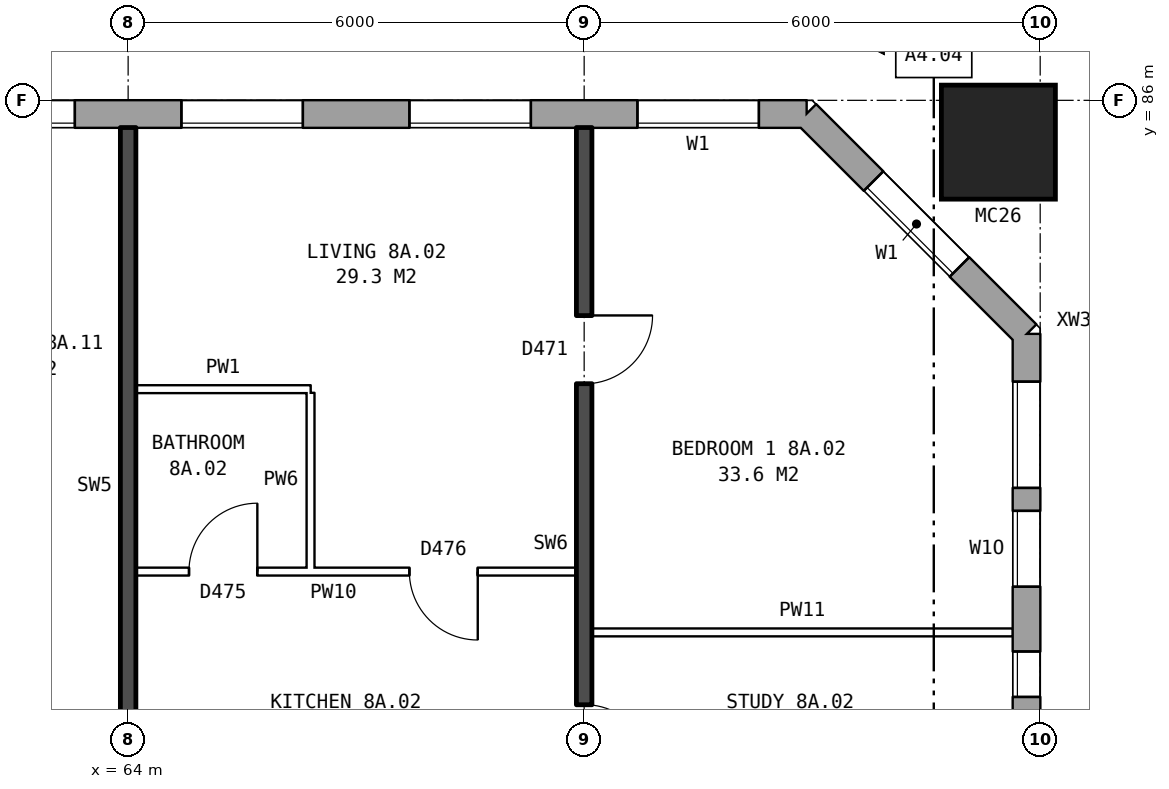
"""IFC4 building model, lengths in metres.
Left out: names, types, materials, properties, quantities, classifications, styles, units other than length and angle.
Written with IfcOpenShell. Run it as: python <this file> out.ifc"""

import sys

from ifc_helpers import new_model, si_unit, direction, frame, frame_2d, origin, origin_2d, place, context, subcontext, project, spatial, rectangle, hollow_rectangle, extrude, element, fill, save


model = new_model("IFC4")
c1 = context("Model", 3, precision=1e-05, world=origin(), true_north=direction((0.0, 1.0)))
c2 = subcontext(c1, "Body", "Model", "MODEL_VIEW")
j1 = project(units=[si_unit("LENGTHUNIT", "METRE"), si_unit("PLANEANGLEUNIT", "RADIAN")], contexts=[c1])
p1 = place(None, origin())
s1 = spatial("IfcSite", under=j1, at=p1, CompositionType="ELEMENT")
p2 = place(p1, origin())
s2 = spatial("IfcBuilding", under=s1, at=p2, CompositionType="ELEMENT")
p3 = place(p2, frame((0.0, 0.0, 31.9)))
s3 = spatial("IfcBuildingStorey", under=s2, at=p3, CompositionType="ELEMENT", Elevation=31.9)
p4 = place(p3, frame((75.45, 85.45, 0.0), z_axis=(0.0, 0.0, 1.0), x_axis=(1.0, 0.0, 0.0)))
e1 = element("IfcColumn", 1, at=p4, inside=s3, PredefinedType="COLUMN", context=c2, shape_type="SweptSolid", body=[
    extrude(hollow_rectangle(XDim=1.5, YDim=1.5, WallThickness=0.08, at=origin_2d()), origin(), (0.0, 0.0, 1.0), 3.1),
])
p5 = place(p3, frame((75.82, 57.075, 0.0), z_axis=(0.0, 0.0, 1.0), x_axis=(0.0, 1.0, 0.0)))
e2 = element("IfcWall", 2, at=p5, inside=s3, PredefinedType="STANDARD", context=c2, shape_type="SweptSolid", body=[
    extrude(rectangle(XDim=25.851, YDim=0.36, at=frame_2d((12.925, 0.0))), origin(), (0.0, 0.0, 1.0), 2.85),
])
p6 = place(p5, frame((0.3, 0.0, 0.8)))
e3 = element("IfcOpeningElement", 3, at=p6, cuts=e2, PredefinedType="OPENING", context=c2, shape_type="SweptSolid", body=[
    extrude(rectangle(XDim=1.4, YDim=1.8, at=frame_2d((0.7, 0.9))), frame((0.0, 0.19, 0.0), z_axis=(0.0, -1.0, 0.0), x_axis=(1.0, 0.0, 0.0)), (0.0, 0.0, 1.0), 0.38),
])
p7 = place(p5, frame((4.075, 0.0, 0.25)))
e4 = element("IfcOpeningElement", 4, at=p7, cuts=e2, PredefinedType="OPENING", context=c2, shape_type="SweptSolid", body=[
    extrude(rectangle(XDim=0.6, YDim=0.9, at=frame_2d((0.3, 0.45))), frame((0.0, 0.19, 0.0), z_axis=(0.0, -1.0, 0.0), x_axis=(1.0, 0.0, 0.0)), (0.0, 0.0, 1.0), 0.38),
])
p8 = place(p5, frame((19.225, 0.0, 1.65)))
e5 = element("IfcOpeningElement", 5, at=p8, cuts=e2, PredefinedType="OPENING", context=c2, shape_type="SweptSolid", body=[
    extrude(rectangle(XDim=1.4, YDim=0.9, at=frame_2d((0.7, 0.45))), frame((0.0, 0.19, 0.0), z_axis=(0.0, -1.0, 0.0), x_axis=(1.0, 0.0, 0.0)), (0.0, 0.0, 1.0), 0.38),
])
p9 = place(p5, frame((22.525, 0.0, 0.8)))
e6 = element("IfcOpeningElement", 6, at=p9, cuts=e2, PredefinedType="OPENING", context=c2, shape_type="SweptSolid", body=[
    extrude(rectangle(XDim=1.0, YDim=1.2, at=frame_2d((0.5, 0.6))), frame((0.0, 0.19, 0.0), z_axis=(0.0, -1.0, 0.0), x_axis=(1.0, 0.0, 0.0)), (0.0, 0.0, 1.0), 0.38),
])
p10 = place(p5, frame((2.0, 0.0, 0.8)))
e7 = element("IfcOpeningElement", 7, at=p10, cuts=e2, PredefinedType="OPENING", context=c2, shape_type="SweptSolid", body=[
    extrude(rectangle(XDim=0.8, YDim=1.5, at=frame_2d((0.4, 0.75))), frame((0.0, 0.19, 0.0), z_axis=(0.0, -1.0, 0.0), x_axis=(1.0, 0.0, 0.0)), (0.0, 0.0, 1.0), 0.38),
])
p11 = place(p5, frame((5.125, 0.0, 1.65)))
e8 = element("IfcOpeningElement", 8, at=p11, cuts=e2, PredefinedType="OPENING", context=c2, shape_type="SweptSolid", body=[
    extrude(rectangle(XDim=1.4, YDim=0.9, at=frame_2d((0.7, 0.45))), frame((0.0, 0.19, 0.0), z_axis=(0.0, -1.0, 0.0), x_axis=(1.0, 0.0, 0.0)), (0.0, 0.0, 1.0), 0.38),
])
p12 = place(p5, frame((21.075, 0.0, 0.25)))
e9 = element("IfcOpeningElement", 9, at=p12, cuts=e2, PredefinedType="OPENING", context=c2, shape_type="SweptSolid", body=[
    extrude(rectangle(XDim=0.6, YDim=0.9, at=frame_2d((0.3, 0.45))), frame((0.0, 0.19, 0.0), z_axis=(0.0, -1.0, 0.0), x_axis=(1.0, 0.0, 0.0)), (0.0, 0.0, 1.0), 0.38),
])
p13 = place(p5, frame((23.825, 0.0, 0.8)))
e10 = element("IfcOpeningElement", 10, at=p13, cuts=e2, PredefinedType="OPENING", context=c2, shape_type="SweptSolid", body=[
    extrude(rectangle(XDim=1.4, YDim=1.8, at=frame_2d((0.7, 0.9))), frame((0.0, 0.19, 0.0), z_axis=(0.0, -1.0, 0.0), x_axis=(1.0, 0.0, 0.0)), (0.0, 0.0, 1.0), 0.38),
])
p14 = place(p3, frame((75.82, 82.925, 0.0), z_axis=(0.0, 0.0, 1.0), x_axis=(-0.707106781187, 0.707106781187, 0.0)))
e11 = element("IfcWall", 11, at=p14, inside=s3, PredefinedType="STANDARD", context=c2, shape_type="SweptSolid", body=[
    extrude(rectangle(XDim=4.094, YDim=0.36, at=frame_2d((2.047, 0.0))), origin(), (0.0, 0.0, 1.0), 2.85),
])
p15 = place(p14, frame((1.247, 0.0, 0.8)))
e12 = element("IfcOpeningElement", 12, at=p15, cuts=e11, PredefinedType="OPENING", context=c2, shape_type="SweptSolid", body=[
    extrude(rectangle(XDim=1.6, YDim=1.8, at=frame_2d((0.8, 0.9))), frame((0.0, 0.19, 0.0), z_axis=(0.0, -1.0, 0.0), x_axis=(1.0, 0.0, 0.0)), (0.0, 0.0, 1.0), 0.38),
])
p16 = place(p3, frame((72.925, 85.82, 0.0), z_axis=(0.0, 0.0, 1.0), x_axis=(-1.0, 0.0, 0.0)))
e13 = element("IfcWall", 13, at=p16, inside=s3, PredefinedType="STANDARD", context=c2, shape_type="SweptSolid", body=[
    extrude(rectangle(XDim=50.101, YDim=0.36, at=frame_2d((25.05, 0.0))), origin(), (0.0, 0.0, 1.0), 2.85),
])
p17 = place(p16, frame((0.625, 0.0, 0.8)))
e14 = element("IfcOpeningElement", 14, at=p17, cuts=e13, PredefinedType="OPENING", context=c2, shape_type="SweptSolid", body=[
    extrude(rectangle(XDim=1.6, YDim=1.8, at=frame_2d((0.8, 0.9))), frame((0.0, 0.19, 0.0), z_axis=(0.0, -1.0, 0.0), x_axis=(1.0, 0.0, 0.0)), (0.0, 0.0, 1.0), 0.38),
])
p18 = place(p16, frame((3.625, 0.0, 0.8)))
e15 = element("IfcOpeningElement", 15, at=p18, cuts=e13, PredefinedType="OPENING", context=c2, shape_type="SweptSolid", body=[
    extrude(rectangle(XDim=1.6, YDim=1.8, at=frame_2d((0.8, 0.9))), frame((0.0, 0.19, 0.0), z_axis=(0.0, -1.0, 0.0), x_axis=(1.0, 0.0, 0.0)), (0.0, 0.0, 1.0), 0.38),
])
p19 = place(p16, frame((6.625, 0.0, 0.8)))
e16 = element("IfcOpeningElement", 16, at=p19, cuts=e13, PredefinedType="OPENING", context=c2, shape_type="SweptSolid", body=[
    extrude(rectangle(XDim=1.6, YDim=1.8, at=frame_2d((0.8, 0.9))), frame((0.0, 0.19, 0.0), z_axis=(0.0, -1.0, 0.0), x_axis=(1.0, 0.0, 0.0)), (0.0, 0.0, 1.0), 0.38),
])
p20 = place(p16, frame((9.625, 0.0, 0.8)))
e17 = element("IfcOpeningElement", 17, at=p20, cuts=e13, PredefinedType="OPENING", context=c2, shape_type="SweptSolid", body=[
    extrude(rectangle(XDim=1.6, YDim=1.8, at=frame_2d((0.8, 0.9))), frame((0.0, 0.19, 0.0), z_axis=(0.0, -1.0, 0.0), x_axis=(1.0, 0.0, 0.0)), (0.0, 0.0, 1.0), 0.38),
])
p21 = place(p16, frame((12.625, 0.0, 0.8)))
e18 = element("IfcOpeningElement", 18, at=p21, cuts=e13, PredefinedType="OPENING", context=c2, shape_type="SweptSolid", body=[
    extrude(rectangle(XDim=1.6, YDim=1.8, at=frame_2d((0.8, 0.9))), frame((0.0, 0.19, 0.0), z_axis=(0.0, -1.0, 0.0), x_axis=(1.0, 0.0, 0.0)), (0.0, 0.0, 1.0), 0.38),
])
p22 = place(p16, frame((15.125, 0.0, 0.8)))
e19 = element("IfcOpeningElement", 19, at=p22, cuts=e13, PredefinedType="OPENING", context=c2, shape_type="SweptSolid", body=[
    extrude(rectangle(XDim=1.6, YDim=1.8, at=frame_2d((0.8, 0.9))), frame((0.0, 0.19, 0.0), z_axis=(0.0, -1.0, 0.0), x_axis=(1.0, 0.0, 0.0)), (0.0, 0.0, 1.0), 0.38),
])
p23 = place(p16, frame((18.575, 0.0, 0.15)))
e20 = element("IfcOpeningElement", 20, at=p23, cuts=e13, PredefinedType="OPENING", context=c2, shape_type="SweptSolid", body=[
    extrude(rectangle(XDim=0.6, YDim=0.9, at=frame_2d((0.3, 0.45))), frame((0.0, 0.19, 0.0), z_axis=(0.0, -1.0, 0.0), x_axis=(1.0, 0.0, 0.0)), (0.0, 0.0, 1.0), 0.38),
])
p24 = place(p16, frame((21.625, 0.0, 0.8)))
e21 = element("IfcOpeningElement", 21, at=p24, cuts=e13, PredefinedType="OPENING", context=c2, shape_type="SweptSolid", body=[
    extrude(rectangle(XDim=1.6, YDim=1.8, at=frame_2d((0.8, 0.9))), frame((0.0, 0.19, 0.0), z_axis=(0.0, -1.0, 0.0), x_axis=(1.0, 0.0, 0.0)), (0.0, 0.0, 1.0), 0.38),
])
p25 = place(p16, frame((24.625, 0.0, 0.8)))
e22 = element("IfcOpeningElement", 22, at=p25, cuts=e13, PredefinedType="OPENING", context=c2, shape_type="SweptSolid", body=[
    extrude(rectangle(XDim=1.6, YDim=1.8, at=frame_2d((0.8, 0.9))), frame((0.0, 0.19, 0.0), z_axis=(0.0, -1.0, 0.0), x_axis=(1.0, 0.0, 0.0)), (0.0, 0.0, 1.0), 0.38),
])
p26 = place(p16, frame((27.625, 0.0, 0.8)))
e23 = element("IfcOpeningElement", 23, at=p26, cuts=e13, PredefinedType="OPENING", context=c2, shape_type="SweptSolid", body=[
    extrude(rectangle(XDim=1.6, YDim=1.8, at=frame_2d((0.8, 0.9))), frame((0.0, 0.19, 0.0), z_axis=(0.0, -1.0, 0.0), x_axis=(1.0, 0.0, 0.0)), (0.0, 0.0, 1.0), 0.38),
])
p27 = place(p16, frame((29.525, 0.0, 0.8)))
e24 = element("IfcOpeningElement", 24, at=p27, cuts=e13, PredefinedType="OPENING", context=c2, shape_type="SweptSolid", body=[
    extrude(rectangle(XDim=1.0, YDim=0.9, at=frame_2d((0.5, 0.45))), frame((0.0, 0.19, 0.0), z_axis=(0.0, -1.0, 0.0), x_axis=(1.0, 0.0, 0.0)), (0.0, 0.0, 1.0), 0.38),
])
p28 = place(p16, frame((33.625, 0.0, 0.8)))
e25 = element("IfcOpeningElement", 25, at=p28, cuts=e13, PredefinedType="OPENING", context=c2, shape_type="SweptSolid", body=[
    extrude(rectangle(XDim=1.6, YDim=1.8, at=frame_2d((0.8, 0.9))), frame((0.0, 0.19, 0.0), z_axis=(0.0, -1.0, 0.0), x_axis=(1.0, 0.0, 0.0)), (0.0, 0.0, 1.0), 0.38),
])
p29 = place(p16, frame((36.625, 0.0, 0.8)))
e26 = element("IfcOpeningElement", 26, at=p29, cuts=e13, PredefinedType="OPENING", context=c2, shape_type="SweptSolid", body=[
    extrude(rectangle(XDim=1.6, YDim=1.8, at=frame_2d((0.8, 0.9))), frame((0.0, 0.19, 0.0), z_axis=(0.0, -1.0, 0.0), x_axis=(1.0, 0.0, 0.0)), (0.0, 0.0, 1.0), 0.38),
])
p30 = place(p16, frame((39.625, 0.0, 0.8)))
e27 = element("IfcOpeningElement", 27, at=p30, cuts=e13, PredefinedType="OPENING", context=c2, shape_type="SweptSolid", body=[
    extrude(rectangle(XDim=1.6, YDim=1.8, at=frame_2d((0.8, 0.9))), frame((0.0, 0.19, 0.0), z_axis=(0.0, -1.0, 0.0), x_axis=(1.0, 0.0, 0.0)), (0.0, 0.0, 1.0), 0.38),
])
p31 = place(p16, frame((42.625, 0.0, 0.8)))
e28 = element("IfcOpeningElement", 28, at=p31, cuts=e13, PredefinedType="OPENING", context=c2, shape_type="SweptSolid", body=[
    extrude(rectangle(XDim=1.6, YDim=1.8, at=frame_2d((0.8, 0.9))), frame((0.0, 0.19, 0.0), z_axis=(0.0, -1.0, 0.0), x_axis=(1.0, 0.0, 0.0)), (0.0, 0.0, 1.0), 0.38),
])
p32 = place(p16, frame((45.625, 0.0, 0.8)))
e29 = element("IfcOpeningElement", 29, at=p32, cuts=e13, PredefinedType="OPENING", context=c2, shape_type="SweptSolid", body=[
    extrude(rectangle(XDim=1.6, YDim=1.8, at=frame_2d((0.8, 0.9))), frame((0.0, 0.19, 0.0), z_axis=(0.0, -1.0, 0.0), x_axis=(1.0, 0.0, 0.0)), (0.0, 0.0, 1.0), 0.38),
])
p33 = place(p16, frame((17.025, 0.0, 1.4)))
e30 = element("IfcOpeningElement", 30, at=p33, cuts=e13, PredefinedType="OPENING", context=c2, shape_type="SweptSolid", body=[
    extrude(rectangle(XDim=0.6, YDim=1.2, at=frame_2d((0.3, 0.6))), frame((0.0, 0.19, 0.0), z_axis=(0.0, -1.0, 0.0), x_axis=(1.0, 0.0, 0.0)), (0.0, 0.0, 1.0), 0.38),
])
p34 = place(p16, frame((19.475, 0.0, 0.15)))
e31 = element("IfcOpeningElement", 31, at=p34, cuts=e13, PredefinedType="OPENING", context=c2, shape_type="SweptSolid", body=[
    extrude(rectangle(XDim=1.2, YDim=1.5, at=frame_2d((0.6, 0.75))), frame((0.0, 0.19, 0.0), z_axis=(0.0, -1.0, 0.0), x_axis=(1.0, 0.0, 0.0)), (0.0, 0.0, 1.0), 0.38),
])
p35 = place(p16, frame((31.975, 0.0, 1.7)))
e32 = element("IfcOpeningElement", 32, at=p35, cuts=e13, PredefinedType="OPENING", context=c2, shape_type="SweptSolid", body=[
    extrude(rectangle(XDim=0.6, YDim=0.9, at=frame_2d((0.3, 0.45))), frame((0.0, 0.19, 0.0), z_axis=(0.0, -1.0, 0.0), x_axis=(1.0, 0.0, 0.0)), (0.0, 0.0, 1.0), 0.38),
])
p36 = place(p3, frame((70.1, 79.0, 0.0), z_axis=(0.0, 0.0, 1.0), x_axis=(1.0, 0.0, 0.0)))
e33 = element("IfcWall", 33, at=p36, inside=s3, PredefinedType="PARTITIONING", context=c2, shape_type="SweptSolid", body=[
    extrude(rectangle(XDim=5.54, YDim=0.1, at=frame_2d((2.77, 0.0))), origin(), (0.0, 0.0, 1.0), 2.85),
])
p37 = place(p3, frame((64.1, 79.8, 0.0), z_axis=(0.0, 0.0, 1.0), x_axis=(1.0, 0.0, 0.0)))
e34 = element("IfcWall", 34, at=p37, inside=s3, PredefinedType="PARTITIONING", context=c2, shape_type="SweptSolid", body=[
    extrude(rectangle(XDim=5.8, YDim=0.1, at=frame_2d((2.9, 0.0))), origin(), (0.0, 0.0, 1.0), 2.85),
])
p38 = place(p37, frame((3.6, 0.0, 0.0)))
e35 = element("IfcOpeningElement", 35, at=p38, cuts=e34, PredefinedType="OPENING", context=c2, shape_type="SweptSolid", body=[
    extrude(rectangle(XDim=0.9, YDim=2.1, at=frame_2d((0.45, 1.05))), frame((0.0, 0.06, 0.0), z_axis=(0.0, -1.0, 0.0), x_axis=(1.0, 0.0, 0.0)), (0.0, 0.0, 1.0), 0.12),
])
p39 = place(p37, frame((0.7, 0.0, 0.0)))
e36 = element("IfcOpeningElement", 36, at=p39, cuts=e34, PredefinedType="OPENING", context=c2, shape_type="SweptSolid", body=[
    extrude(rectangle(XDim=0.9, YDim=2.1, at=frame_2d((0.45, 1.05))), frame((0.0, 0.06, 0.0), z_axis=(0.0, -1.0, 0.0), x_axis=(1.0, 0.0, 0.0)), (0.0, 0.0, 1.0), 0.12),
])
p40 = place(p3, frame((64.1, 82.2, 0.0), z_axis=(0.0, 0.0, 1.0), x_axis=(1.0, 0.0, 0.0)))
e37 = element("IfcWall", 37, at=p40, inside=s3, PredefinedType="PARTITIONING", context=c2, shape_type="SweptSolid", body=[
    extrude(rectangle(XDim=2.3, YDim=0.1, at=frame_2d((1.15, 0.0))), origin(), (0.0, 0.0, 1.0), 2.85),
])
p41 = place(p3, frame((64.0, 76.2, 0.0), z_axis=(0.0, 0.0, 1.0), x_axis=(0.0, 1.0, 0.0)))
e38 = element("IfcWall", 38, at=p41, inside=s3, PredefinedType="SOLIDWALL", context=c2, shape_type="SweptSolid", body=[
    extrude(rectangle(XDim=9.44, YDim=0.2, at=frame_2d((4.72, 0.0))), origin(), (0.0, 0.0, 1.0), 2.85),
])
p42 = place(p3, frame((66.4, 79.85, 0.0), z_axis=(0.0, 0.0, 1.0), x_axis=(0.0, 1.0, 0.0)))
e39 = element("IfcWall", 39, at=p42, inside=s3, PredefinedType="PARTITIONING", context=c2, shape_type="SweptSolid", body=[
    extrude(rectangle(XDim=2.3, YDim=0.1, at=frame_2d((1.15, 0.0))), origin(), (0.0, 0.0, 1.0), 2.85),
])
p43 = place(p3, frame((70.0, 76.2, 0.0), z_axis=(0.0, 0.0, 1.0), x_axis=(0.0, 1.0, 0.0)))
e40 = element("IfcWall", 40, at=p43, inside=s3, PredefinedType="SOLIDWALL", context=c2, shape_type="SweptSolid", body=[
    extrude(rectangle(XDim=9.44, YDim=0.2, at=frame_2d((4.72, 0.0))), origin(), (0.0, 0.0, 1.0), 2.85),
])
p44 = place(p43, frame((6.07, 0.0, 0.0)))
e41 = element("IfcOpeningElement", 41, at=p44, cuts=e40, PredefinedType="OPENING", context=c2, shape_type="SweptSolid", body=[
    extrude(rectangle(XDim=0.9, YDim=2.1, at=frame_2d((0.45, 1.05))), frame((0.0, 0.11, 0.0), z_axis=(0.0, -1.0, 0.0), x_axis=(1.0, 0.0, 0.0)), (0.0, 0.0, 1.0), 0.22),
])
p45 = place(p43, frame((0.95, 0.0, 0.0)))
e42 = element("IfcOpeningElement", 42, at=p45, cuts=e40, PredefinedType="OPENING", context=c2, shape_type="SweptSolid", body=[
    extrude(rectangle(XDim=0.9, YDim=2.1, at=frame_2d((0.45, 1.05))), frame((0.0, 0.11, 0.0), z_axis=(0.0, -1.0, 0.0), x_axis=(1.0, 0.0, 0.0)), (0.0, 0.0, 1.0), 0.22),
])
p46 = place(p9, origin())
e43 = element("IfcWindow", 43, at=p46, inside=s3, PartitioningType="SINGLE_PANEL", PredefinedType="WINDOW", context=c2, shape_type="SweptSolid", body=[
    extrude(rectangle(XDim=1.0, YDim=1.2, at=frame_2d((0.5, 0.6))), frame((0.0, 0.15, 0.0), z_axis=(0.0, -1.0, 0.0), x_axis=(1.0, 0.0, 0.0)), (0.0, 0.0, 1.0), 0.06),
])
fill(e6, e43)
p47 = place(p15, origin())
e44 = element("IfcWindow", 44, at=p47, inside=s3, PartitioningType="SINGLE_PANEL", PredefinedType="WINDOW", context=c2, shape_type="SweptSolid", body=[
    extrude(rectangle(XDim=1.6, YDim=1.8, at=frame_2d((0.8, 0.9))), frame((0.0, 0.15, 0.0), z_axis=(0.0, -1.0, 0.0), x_axis=(1.0, 0.0, 0.0)), (0.0, 0.0, 1.0), 0.06),
])
fill(e12, e44)
p48 = place(p17, origin())
e45 = element("IfcWindow", 45, at=p48, inside=s3, PartitioningType="SINGLE_PANEL", PredefinedType="WINDOW", context=c2, shape_type="SweptSolid", body=[
    extrude(rectangle(XDim=1.6, YDim=1.8, at=frame_2d((0.8, 0.9))), frame((0.0, 0.15, 0.0), z_axis=(0.0, -1.0, 0.0), x_axis=(1.0, 0.0, 0.0)), (0.0, 0.0, 1.0), 0.06),
])
fill(e14, e45)
p49 = place(p18, origin())
e46 = element("IfcWindow", 46, at=p49, inside=s3, PartitioningType="SINGLE_PANEL", PredefinedType="WINDOW", context=c2, shape_type="SweptSolid", body=[
    extrude(rectangle(XDim=1.6, YDim=1.8, at=frame_2d((0.8, 0.9))), frame((0.0, 0.15, 0.0), z_axis=(0.0, -1.0, 0.0), x_axis=(1.0, 0.0, 0.0)), (0.0, 0.0, 1.0), 0.06),
])
fill(e15, e46)
p50 = place(p19, origin())
e47 = element("IfcWindow", 47, at=p50, inside=s3, PartitioningType="SINGLE_PANEL", PredefinedType="WINDOW", context=c2, shape_type="SweptSolid", body=[
    extrude(rectangle(XDim=1.6, YDim=1.8, at=frame_2d((0.8, 0.9))), frame((0.0, 0.15, 0.0), z_axis=(0.0, -1.0, 0.0), x_axis=(1.0, 0.0, 0.0)), (0.0, 0.0, 1.0), 0.06),
])
fill(e16, e47)
p51 = place(p20, origin())
e48 = element("IfcWindow", 48, at=p51, inside=s3, PartitioningType="SINGLE_PANEL", PredefinedType="WINDOW", context=c2, shape_type="SweptSolid", body=[
    extrude(rectangle(XDim=1.6, YDim=1.8, at=frame_2d((0.8, 0.9))), frame((0.0, 0.15, 0.0), z_axis=(0.0, -1.0, 0.0), x_axis=(1.0, 0.0, 0.0)), (0.0, 0.0, 1.0), 0.06),
])
fill(e17, e48)
p52 = place(p44, frame((0.9, 0.0, 0.0), z_axis=(0.0, 0.0, 1.0), x_axis=(-1.0, 0.0, 0.0)))
e49 = element("IfcDoor", 49, at=p52, inside=s3, OperationType="SINGLE_SWING_LEFT", PredefinedType="DOOR", context=c2, shape_type="SweptSolid", body=[
    extrude(rectangle(XDim=0.9, YDim=2.1, at=frame_2d((0.45, 1.05))), frame((0.0, 0.025, 0.0), z_axis=(0.0, -1.0, 0.0), x_axis=(1.0, 0.0, 0.0)), (0.0, 0.0, 1.0), 0.05),
])
fill(e41, e49)
p53 = place(p45, frame((0.9, 0.0, 0.0), z_axis=(0.0, 0.0, 1.0), x_axis=(-1.0, 0.0, 0.0)))
e50 = element("IfcDoor", 50, at=p53, inside=s3, OperationType="SINGLE_SWING_RIGHT", PredefinedType="DOOR", context=c2, shape_type="SweptSolid", body=[
    extrude(rectangle(XDim=0.9, YDim=2.1, at=frame_2d((0.45, 1.05))), frame((0.0, 0.025, 0.0), z_axis=(0.0, -1.0, 0.0), x_axis=(1.0, 0.0, 0.0)), (0.0, 0.0, 1.0), 0.05),
])
fill(e42, e50)
p54 = place(p38, frame((0.9, 0.0, 0.0), z_axis=(0.0, 0.0, 1.0), x_axis=(-1.0, 0.0, 0.0)))
e51 = element("IfcDoor", 51, at=p54, inside=s3, OperationType="SINGLE_SWING_LEFT", PredefinedType="DOOR", context=c2, shape_type="SweptSolid", body=[
    extrude(rectangle(XDim=0.9, YDim=2.1, at=frame_2d((0.45, 1.05))), frame((0.0, 0.025, 0.0), z_axis=(0.0, -1.0, 0.0), x_axis=(1.0, 0.0, 0.0)), (0.0, 0.0, 1.0), 0.05),
])
fill(e35, e51)
p55 = place(p39, origin())
e52 = element("IfcDoor", 52, at=p55, inside=s3, OperationType="SINGLE_SWING_RIGHT", PredefinedType="DOOR", context=c2, shape_type="SweptSolid", body=[
    extrude(rectangle(XDim=0.9, YDim=2.1, at=frame_2d((0.45, 1.05))), frame((0.0, 0.025, 0.0), z_axis=(0.0, -1.0, 0.0), x_axis=(1.0, 0.0, 0.0)), (0.0, 0.0, 1.0), 0.05),
])
fill(e36, e52)
p56 = place(p12, origin())
e53 = element("IfcWindow", 53, at=p56, inside=s3, PartitioningType="SINGLE_PANEL", PredefinedType="WINDOW", context=c2, shape_type="SweptSolid", body=[
    extrude(rectangle(XDim=0.6, YDim=0.9, at=frame_2d((0.3, 0.45))), frame((0.0, 0.15, 0.0), z_axis=(0.0, -1.0, 0.0), x_axis=(1.0, 0.0, 0.0)), (0.0, 0.0, 1.0), 0.06),
])
fill(e9, e53)
p57 = place(p13, origin())
e54 = element("IfcWindow", 54, at=p57, inside=s3, PartitioningType="SINGLE_PANEL", PredefinedType="WINDOW", context=c2, shape_type="SweptSolid", body=[
    extrude(rectangle(XDim=1.4, YDim=1.8, at=frame_2d((0.7, 0.9))), frame((0.0, 0.15, 0.0), z_axis=(0.0, -1.0, 0.0), x_axis=(1.0, 0.0, 0.0)), (0.0, 0.0, 1.0), 0.06),
])
fill(e10, e54)
save(model, sys.argv[1])
